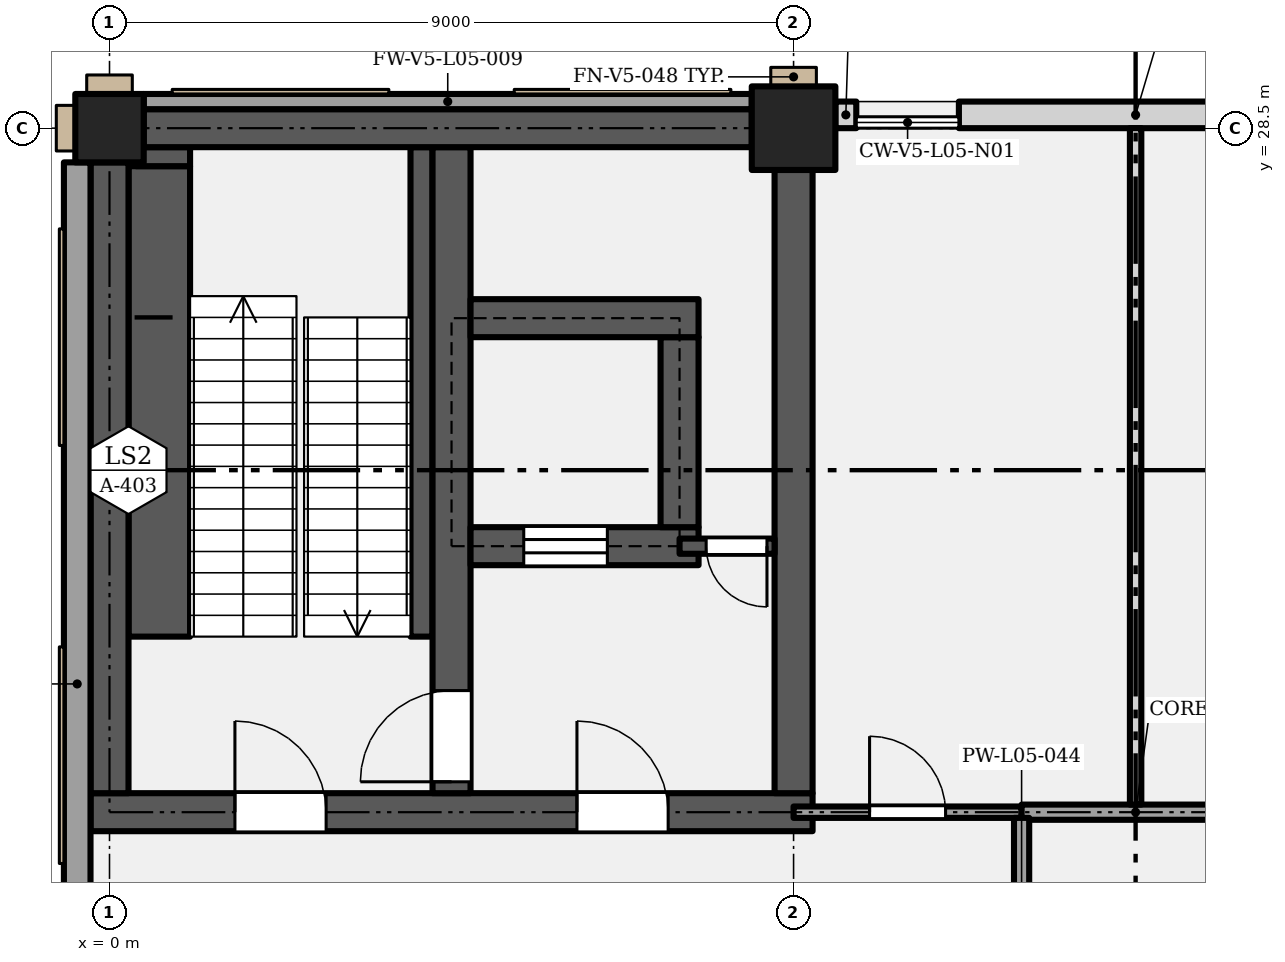
"""IFC4 building model, lengths in metres.
Left out: names, types, materials, properties, quantities, classifications, styles, units other than length and angle.
Written with IfcOpenShell. Run it as: python <this file> out.ifc"""

import sys

from ifc_helpers import new_model, si_unit, direction, frame, frame_2d, origin, origin_2d, place, context, subcontext, project, spatial, rectangle, extrude, element, fill, save


model = new_model("IFC4")
c1 = context("Model", 3, precision=1e-05, world=origin(), true_north=direction((0.0, 1.0)))
c2 = subcontext(c1, "Body", "Model", "MODEL_VIEW")
j1 = project(units=[si_unit("LENGTHUNIT", "METRE"), si_unit("PLANEANGLEUNIT", "RADIAN")], contexts=[c1])
p1 = place(None, origin())
s1 = spatial("IfcSite", under=j1, at=p1, CompositionType="ELEMENT")
p2 = place(p1, origin())
s2 = spatial("IfcBuilding", under=s1, at=p2, CompositionType="ELEMENT")
p3 = place(p2, frame((0.0, 0.0, 28.2)))
s3 = spatial("IfcBuildingStorey", under=s2, at=p3, CompositionType="ELEMENT", Elevation=28.2)
p4 = place(p3, frame((0.0, 28.5, 0.0), z_axis=(0.0, 0.0, 1.0), x_axis=(1.0, 0.0, 0.0)))
e1 = element("IfcColumn", 1, at=p4, inside=s3, PredefinedType="COLUMN", context=c2, shape_type="SweptSolid", body=[
    extrude(rectangle(XDim=0.9, YDim=0.9, at=origin_2d()), origin(), (0.0, 0.0, 1.0), 5.4),
])
p5 = place(p3, frame((9.0, 28.5, 0.0), z_axis=(0.0, 0.0, 1.0), x_axis=(1.0, 0.0, 0.0)))
e2 = element("IfcColumn", 2, at=p5, inside=s3, PredefinedType="COLUMN", context=c2, shape_type="SweptSolid", body=[
    extrude(rectangle(XDim=1.1, YDim=1.1, at=origin_2d()), origin(), (0.0, 0.0, 1.0), 5.4),
])
p6 = place(p3, frame((-0.25, 19.5, 0.0), z_axis=(0.0, 0.0, 1.0), x_axis=(1.0, 0.0, 0.0)))
e3 = element("IfcWall", 3, at=p6, inside=s3, PredefinedType="SHEAR", context=c2, shape_type="SweptSolid", body=[
    extrude(rectangle(XDim=9.5, YDim=0.5, at=frame_2d((4.75, 0.0))), origin(), (0.0, 0.0, 1.0), 5.15),
])
p7 = place(p6, frame((1.9, 0.0, 0.0)))
e4 = element("IfcOpeningElement", 4, at=p7, cuts=e3, PredefinedType="OPENING", context=c2, shape_type="SweptSolid", body=[
    extrude(rectangle(XDim=1.2, YDim=2.1, at=frame_2d((0.6, 1.05))), frame((0.0, 0.26, 0.0), z_axis=(0.0, -1.0, 0.0), x_axis=(1.0, 0.0, 0.0)), (0.0, 0.0, 1.0), 0.52),
])
p8 = place(p6, frame((6.4, 0.0, 0.0)))
e5 = element("IfcOpeningElement", 5, at=p8, cuts=e3, PredefinedType="OPENING", context=c2, shape_type="SweptSolid", body=[
    extrude(rectangle(XDim=1.2, YDim=2.1, at=frame_2d((0.6, 1.05))), frame((0.0, 0.26, 0.0), z_axis=(0.0, -1.0, 0.0), x_axis=(1.0, 0.0, 0.0)), (0.0, 0.0, 1.0), 0.52),
])
p9 = place(p3, frame((0.0, 19.75, 0.0), z_axis=(0.0, 0.0, 1.0), x_axis=(0.0, 1.0, 0.0)))
e6 = element("IfcWall", 6, at=p9, inside=s3, PredefinedType="SHEAR", context=c2, shape_type="SweptSolid", body=[
    extrude(rectangle(XDim=8.3, YDim=0.5, at=frame_2d((4.15, 0.0))), origin(), (0.0, 0.0, 1.0), 5.15),
])
p10 = place(p3, frame((4.5, 19.75, 0.0), z_axis=(0.0, 0.0, 1.0), x_axis=(0.0, 1.0, 0.0)))
e7 = element("IfcWall", 7, at=p10, inside=s3, PredefinedType="SHEAR", context=c2, shape_type="SweptSolid", body=[
    extrude(rectangle(XDim=8.5, YDim=0.5, at=frame_2d((4.25, 0.0))), origin(), (0.0, 0.0, 1.0), 5.15),
])
p11 = place(p10, frame((0.15, 0.0, 0.0)))
e8 = element("IfcOpeningElement", 8, at=p11, cuts=e7, PredefinedType="OPENING", context=c2, shape_type="SweptSolid", body=[
    extrude(rectangle(XDim=1.2, YDim=2.1, at=frame_2d((0.6, 1.05))), frame((0.0, 0.26, 0.0), z_axis=(0.0, -1.0, 0.0), x_axis=(1.0, 0.0, 0.0)), (0.0, 0.0, 1.0), 0.52),
])
p12 = place(p3, frame((9.0, 19.75, 0.0), z_axis=(0.0, 0.0, 1.0), x_axis=(0.0, 1.0, 0.0)))
e9 = element("IfcWall", 9, at=p12, inside=s3, PredefinedType="SHEAR", context=c2, shape_type="SweptSolid", body=[
    extrude(rectangle(XDim=8.2, YDim=0.5, at=frame_2d((4.1, 0.0))), origin(), (0.0, 0.0, 1.0), 5.15),
])
p13 = place(p3, frame((4.75, 23.0, 0.0), z_axis=(0.0, 0.0, 1.0), x_axis=(1.0, 0.0, 0.0)))
e10 = element("IfcWall", 10, at=p13, inside=s3, PredefinedType="SHEAR", context=c2, shape_type="SweptSolid", body=[
    extrude(rectangle(XDim=3.0, YDim=0.5, at=frame_2d((1.5, 0.0))), origin(), (0.0, 0.0, 1.0), 5.15),
])
p14 = place(p13, frame((0.7, 0.0, 0.0)))
e11 = element("IfcOpeningElement", 11, at=p14, cuts=e10, PredefinedType="OPENING", context=c2, shape_type="SweptSolid", body=[
    extrude(rectangle(XDim=1.1, YDim=2.1, at=frame_2d((0.55, 1.05))), frame((0.0, 0.26, 0.0), z_axis=(0.0, -1.0, 0.0), x_axis=(1.0, 0.0, 0.0)), (0.0, 0.0, 1.0), 0.52),
])
p15 = place(p3, frame((7.5, 23.25, 0.0), z_axis=(0.0, 0.0, 1.0), x_axis=(0.0, 1.0, 0.0)))
e12 = element("IfcWall", 12, at=p15, inside=s3, PredefinedType="SHEAR", context=c2, shape_type="SweptSolid", body=[
    extrude(rectangle(XDim=2.5, YDim=0.5, at=frame_2d((1.25, 0.0))), origin(), (0.0, 0.0, 1.0), 5.15),
])
p16 = place(p3, frame((4.75, 26.0, 0.0), z_axis=(0.0, 0.0, 1.0), x_axis=(1.0, 0.0, 0.0)))
e13 = element("IfcWall", 13, at=p16, inside=s3, PredefinedType="SHEAR", context=c2, shape_type="SweptSolid", body=[
    extrude(rectangle(XDim=3.0, YDim=0.5, at=frame_2d((1.5, 0.0))), origin(), (0.0, 0.0, 1.0), 5.15),
])
p17 = place(p3, frame((0.45, 28.5, 0.0), z_axis=(0.0, 0.0, 1.0), x_axis=(1.0, 0.0, 0.0)))
e14 = element("IfcWall", 14, at=p17, inside=s3, PredefinedType="SHEAR", context=c2, shape_type="SweptSolid", body=[
    extrude(rectangle(XDim=8.0, YDim=0.5, at=frame_2d((4.0, 0.0))), origin(), (0.0, 0.0, 1.0), 5.15),
])
p18 = place(p3, frame((0.45, 28.85, 0.0), z_axis=(0.0, 0.0, 1.0), x_axis=(1.0, 0.0, 0.0)))
e15 = element("IfcWall", 15, at=p18, inside=s3, PredefinedType="SOLIDWALL", context=c2, shape_type="SweptSolid", body=[
    extrude(rectangle(XDim=8.0, YDim=0.2, at=frame_2d((4.0, 0.0))), origin(), (0.0, 0.0, 1.0), 5.15),
])
p19 = place(p3, frame((9.55, 28.675, 0.0), z_axis=(0.0, 0.0, 1.0), x_axis=(1.0, 0.0, 0.0)))
e16 = element("IfcWall", 16, at=p19, inside=s3, PredefinedType="SOLIDWALL", context=c2, shape_type="SweptSolid", body=[
    extrude(rectangle(XDim=0.275, YDim=0.35, at=frame_2d((0.137, 0.0))), origin(), (0.0, 0.0, 1.0), 5.15),
])
p20 = place(p3, frame((11.175, 28.675, 0.0), z_axis=(0.0, 0.0, 1.0), x_axis=(1.0, 0.0, 0.0)))
e17 = element("IfcWall", 17, at=p20, inside=s3, PredefinedType="SOLIDWALL", context=c2, shape_type="SweptSolid", body=[
    extrude(rectangle(XDim=4.65, YDim=0.35, at=frame_2d((2.325, 0.0))), origin(), (0.0, 0.0, 1.0), 5.15),
])
p21 = place(p3, frame((-0.425, 14.325, 0.0), z_axis=(0.0, 0.0, 1.0), x_axis=(0.0, 1.0, 0.0)))
e18 = element("IfcWall", 18, at=p21, inside=s3, PredefinedType="SOLIDWALL", context=c2, shape_type="SweptSolid", body=[
    extrude(rectangle(XDim=13.725, YDim=0.35, at=frame_2d((6.863, 0.0))), origin(), (0.0, 0.0, 1.0), 5.15),
])
p22 = place(p3, frame((9.0, 19.5, 0.0), z_axis=(0.0, 0.0, 1.0), x_axis=(1.0, 0.0, 0.0)))
e19 = element("IfcWall", 19, at=p22, inside=s3, PredefinedType="PARTITIONING", context=c2, shape_type="SweptSolid", body=[
    extrude(rectangle(XDim=3.0, YDim=0.15, at=frame_2d((1.5, 0.0))), origin(), (0.0, 0.0, 1.0), 5.15),
])
p23 = place(p22, frame((1.0, 0.0, 0.0)))
e20 = element("IfcOpeningElement", 20, at=p23, cuts=e19, PredefinedType="OPENING", context=c2, shape_type="SweptSolid", body=[
    extrude(rectangle(XDim=1.0, YDim=2.1, at=frame_2d((0.5, 1.05))), frame((0.0, 0.085, 0.0), z_axis=(0.0, -1.0, 0.0), x_axis=(1.0, 0.0, 0.0)), (0.0, 0.0, 1.0), 0.17),
])
p24 = place(p3, frame((12.0, 19.5, 0.0), z_axis=(0.0, 0.0, 1.0), x_axis=(1.0, 0.0, 0.0)))
e21 = element("IfcWall", 21, at=p24, inside=s3, PredefinedType="PARTITIONING", context=c2, shape_type="SweptSolid", body=[
    extrude(rectangle(XDim=6.0, YDim=0.2, at=frame_2d((3.0, 0.0))), origin(), (0.0, 0.0, 1.0), 5.15),
])
p25 = place(p24, frame((3.25, 0.0, 0.0)))
e22 = element("IfcOpeningElement", 22, at=p25, cuts=e21, PredefinedType="OPENING", context=c2, shape_type="SweptSolid", body=[
    extrude(rectangle(XDim=1.0, YDim=2.1, at=frame_2d((0.5, 1.05))), frame((0.0, 0.11, 0.0), z_axis=(0.0, -1.0, 0.0), x_axis=(1.0, 0.0, 0.0)), (0.0, 0.0, 1.0), 0.22),
])
p26 = place(p3, frame((7.5, 23.0, 0.0), z_axis=(0.0, 0.0, 1.0), x_axis=(1.0, 0.0, 0.0)))
e23 = element("IfcWall", 23, at=p26, inside=s3, PredefinedType="SHEAR", context=c2, shape_type="SweptSolid", body=[
    extrude(rectangle(XDim=1.25, YDim=0.2, at=frame_2d((0.625, 0.0))), origin(), (0.0, 0.0, 1.0), 5.15),
])
p27 = place(p26, frame((1.15, 0.0, 0.0), z_axis=(0.0, 0.0, 1.0), x_axis=(-1.0, 0.0, 0.0)))
e24 = element("IfcOpeningElement", 24, at=p27, cuts=e23, PredefinedType="OPENING", context=c2, shape_type="SweptSolid", body=[
    extrude(rectangle(XDim=0.8, YDim=2.0, at=frame_2d((0.4, 1.0))), frame((0.0, 0.11, 0.0), z_axis=(0.0, -1.0, 0.0), x_axis=(1.0, 0.0, 0.0)), (0.0, 0.0, 1.0), 0.22),
])
p28 = place(p3, frame((12.0, 17.225, 0.0), z_axis=(0.0, 0.0, 1.0), x_axis=(0.0, 1.0, 0.0)))
e25 = element("IfcWall", 25, at=p28, inside=s3, PredefinedType="PARTITIONING", context=c2, shape_type="SweptSolid", body=[
    extrude(rectangle(XDim=2.2, YDim=0.2, at=frame_2d((1.1, 0.0))), origin(), (0.0, 0.0, 1.0), 5.15),
])
p29 = place(p3, frame((13.5, 19.6, 0.0), z_axis=(0.0, 0.0, 1.0), x_axis=(0.0, 1.0, 0.0)))
e26 = element("IfcWall", 26, at=p29, inside=s3, PredefinedType="PARTITIONING", context=c2, shape_type="SweptSolid", body=[
    extrude(rectangle(XDim=8.9, YDim=0.15, at=frame_2d((4.45, 0.0))), origin(), (0.0, 0.0, 1.0), 5.15),
])
p30 = place(p3, frame((0.655, 21.81, 0.0), z_axis=(0.0, 0.0, 1.0), x_axis=(0.0, 1.0, 0.0)))
e27 = element("IfcWall", 27, at=p30, inside=s3, PredefinedType="SHEAR", context=c2, shape_type="SweptSolid", body=[
    extrude(rectangle(XDim=6.19, YDim=0.81, at=frame_2d((3.095, 0.0))), origin(), (0.0, 0.0, 1.0), 2.587),
])
p31 = place(p3, frame((0.705, 28.0, 0.0), z_axis=(0.0, 0.0, 1.0), x_axis=(0.0, 1.0, 0.0)))
e28 = element("IfcWall", 28, at=p31, inside=s3, PredefinedType="SHEAR", context=c2, shape_type="SweptSolid", body=[
    extrude(rectangle(XDim=0.25, YDim=0.71, at=frame_2d((0.125, 0.0))), origin(), (0.0, 0.0, 1.0), 2.587),
])
p32 = place(p3, frame((4.105, 21.81, 0.0), z_axis=(0.0, 0.0, 1.0), x_axis=(0.0, 1.0, 0.0)))
e29 = element("IfcWall", 29, at=p32, inside=s3, PredefinedType="SHEAR", context=c2, shape_type="SweptSolid", body=[
    extrude(rectangle(XDim=6.44, YDim=0.29, at=frame_2d((3.22, 0.0))), origin(), (0.0, 0.0, 1.0), 2.587),
])
p33 = place(p7, origin())
e30 = element("IfcDoor", 30, at=p33, inside=s3, OperationType="SINGLE_SWING_LEFT", PredefinedType="DOOR", context=c2, shape_type="SweptSolid", body=[
    extrude(rectangle(XDim=1.2, YDim=2.1, at=frame_2d((0.6, 1.05))), frame((0.0, 0.025, 0.0), z_axis=(0.0, -1.0, 0.0), x_axis=(1.0, 0.0, 0.0)), (0.0, 0.0, 1.0), 0.05),
])
fill(e4, e30)
p34 = place(p11, origin())
e31 = element("IfcDoor", 31, at=p34, inside=s3, OperationType="SINGLE_SWING_LEFT", PredefinedType="DOOR", context=c2, shape_type="SweptSolid", body=[
    extrude(rectangle(XDim=1.2, YDim=2.1, at=frame_2d((0.6, 1.05))), frame((0.0, 0.025, 0.0), z_axis=(0.0, -1.0, 0.0), x_axis=(1.0, 0.0, 0.0)), (0.0, 0.0, 1.0), 0.05),
])
fill(e8, e31)
p35 = place(p8, origin())
e32 = element("IfcDoor", 32, at=p35, inside=s3, OperationType="SINGLE_SWING_LEFT", PredefinedType="DOOR", context=c2, shape_type="SweptSolid", body=[
    extrude(rectangle(XDim=1.2, YDim=2.1, at=frame_2d((0.6, 1.05))), frame((0.0, 0.025, 0.0), z_axis=(0.0, -1.0, 0.0), x_axis=(1.0, 0.0, 0.0)), (0.0, 0.0, 1.0), 0.05),
])
fill(e5, e32)
p36 = place(p14, origin())
e33 = element("IfcDoor", 33, at=p36, inside=s3, OperationType="SLIDING_TO_LEFT", PredefinedType="DOOR", context=c2, shape_type="SweptSolid", body=[
    extrude(rectangle(XDim=1.1, YDim=2.1, at=frame_2d((0.55, 1.05))), frame((0.0, 0.025, 0.0), z_axis=(0.0, -1.0, 0.0), x_axis=(1.0, 0.0, 0.0)), (0.0, 0.0, 1.0), 0.05),
])
fill(e11, e33)
p37 = place(p27, origin())
e34 = element("IfcDoor", 34, at=p37, inside=s3, OperationType="SINGLE_SWING_LEFT", PredefinedType="DOOR", context=c2, shape_type="SweptSolid", body=[
    extrude(rectangle(XDim=0.8, YDim=2.0, at=frame_2d((0.4, 1.0))), frame((0.0, 0.025, 0.0), z_axis=(0.0, -1.0, 0.0), x_axis=(1.0, 0.0, 0.0)), (0.0, 0.0, 1.0), 0.05),
])
fill(e24, e34)
p38 = place(p23, origin())
e35 = element("IfcDoor", 35, at=p38, inside=s3, OperationType="SINGLE_SWING_LEFT", PredefinedType="DOOR", context=c2, shape_type="SweptSolid", body=[
    extrude(rectangle(XDim=1.0, YDim=2.1, at=frame_2d((0.5, 1.05))), frame((0.0, 0.025, 0.0), z_axis=(0.0, -1.0, 0.0), x_axis=(1.0, 0.0, 0.0)), (0.0, 0.0, 1.0), 0.05),
])
fill(e20, e35)
save(model, sys.argv[1])
